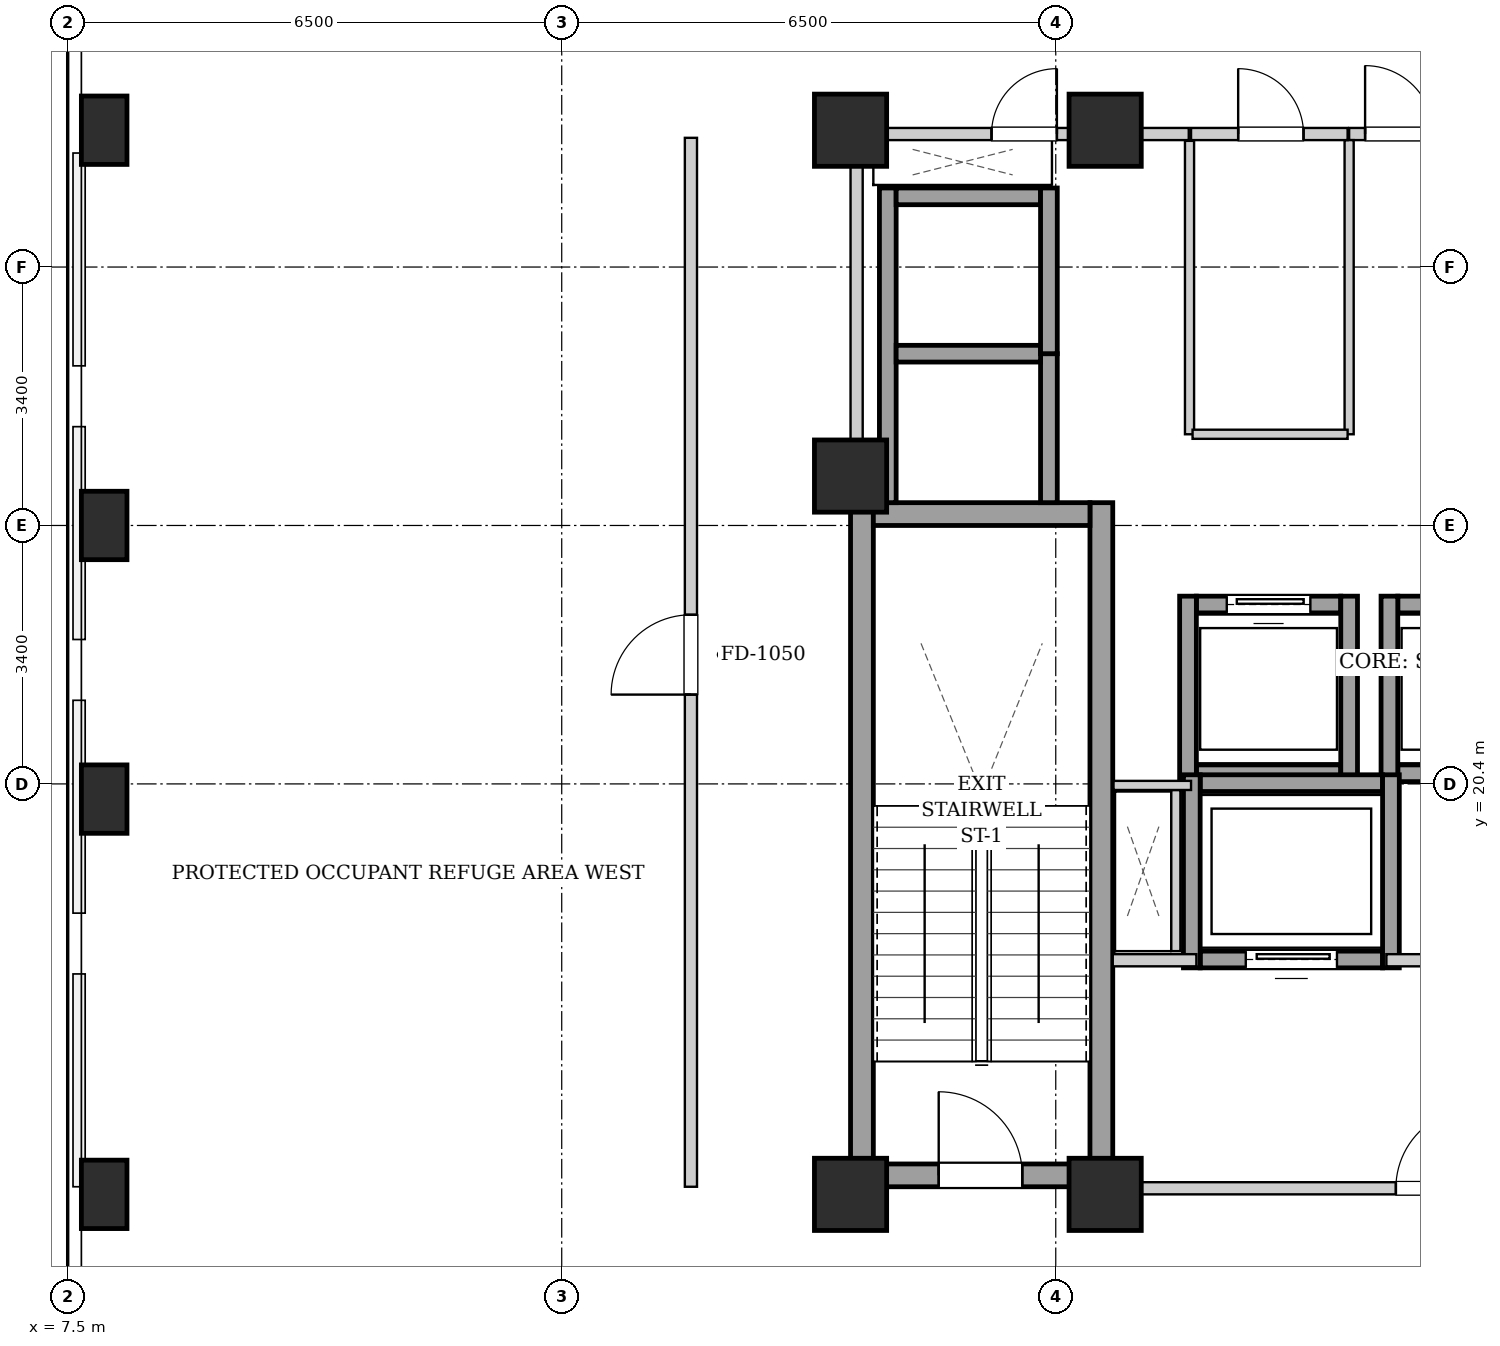
"""IFC4 building model, lengths in metres.
Left out: names, types, materials, properties, quantities, classifications, styles, units other than length and angle.
Written with IfcOpenShell. Run it as: python <this file> out.ifc"""

import sys

from ifc_helpers import new_model, si_unit, direction, frame, frame_2d, origin, origin_2d, place, context, subcontext, project, spatial, rectangle, extrude, element, fill, save


model = new_model("IFC4")
c1 = context("Model", 3, precision=1e-05, world=origin(), true_north=direction((0.0, 1.0)))
c2 = subcontext(c1, "Body", "Model", "MODEL_VIEW")
j1 = project(units=[si_unit("LENGTHUNIT", "METRE"), si_unit("PLANEANGLEUNIT", "RADIAN")], contexts=[c1])
p1 = place(None, origin())
s1 = spatial("IfcSite", under=j1, at=p1, CompositionType="ELEMENT")
p2 = place(p1, origin())
s2 = spatial("IfcBuilding", under=s1, at=p2, CompositionType="ELEMENT")
p3 = place(p2, frame((0.0, 0.0, 169.9)))
s3 = spatial("IfcBuildingStorey", under=s2, at=p3, CompositionType="ELEMENT", Elevation=169.9)
for number, where, z_axis, x_axis in (
    (1, (7.98, 15.0, 0.0), (0.0, 0.0, 1.0), (1.0, 0.0, 0.0)),
    (2, (7.98, 20.2, 0.0), (0.0, 0.0, 1.0), (1.0, 0.0, 0.0)),
    (3, (7.98, 23.8, 0.0), (0.0, 0.0, 1.0), (1.0, 0.0, 0.0)),
    (4, (7.98, 29.0, 0.0), (0.0, 0.0, 1.0), (1.0, 0.0, 0.0)),
):
    element("IfcColumn", number, at=place(p3, frame(where, z_axis=z_axis, x_axis=x_axis)), inside=s3, PredefinedType="COLUMN", context=c2, shape_type="SweptSolid", body=[
        extrude(rectangle(XDim=0.6, YDim=0.9, at=origin_2d()), origin(), (0.0, 0.0, 1.0), 4.5),
    ])
for number, where, z_axis, x_axis in (
    (5, (17.8, 15.0, 0.0), (0.0, 0.0, 1.0), (1.0, 0.0, 0.0)),
    (6, (21.15, 15.0, 0.0), (0.0, 0.0, 1.0), (1.0, 0.0, 0.0)),
    (7, (17.8, 29.0, 0.0), (0.0, 0.0, 1.0), (1.0, 0.0, 0.0)),
    (8, (21.15, 29.0, 0.0), (0.0, 0.0, 1.0), (1.0, 0.0, 0.0)),
    (9, (17.8, 24.45, 0.0), (0.0, 0.0, 1.0), (1.0, 0.0, 0.0)),
):
    element("IfcColumn", number, at=place(p3, frame(where, z_axis=z_axis, x_axis=x_axis)), inside=s3, PredefinedType="COLUMN", context=c2, shape_type="SweptSolid", body=[
        extrude(rectangle(XDim=0.95, YDim=0.95, at=origin_2d()), origin(), (0.0, 0.0, 1.0), 4.5),
    ])
for number, where, z_axis, x_axis in (
    (10, (17.95, 15.1, 0.0), (0.0, 0.0, 1.0), (0.0, 1.0, 0.0)),
    (11, (21.1, 15.1, 0.0), (0.0, 0.0, 1.0), (0.0, 1.0, 0.0)),
):
    element("IfcWall", number, at=place(p3, frame(where, z_axis=z_axis, x_axis=x_axis)), inside=s3, PredefinedType="SHEAR", context=c2, shape_type="SweptSolid", body=[
        extrude(rectangle(XDim=9.0, YDim=0.3, at=frame_2d((4.5, 0.0))), origin(), (0.0, 0.0, 1.0), 4.18),
    ])
p4 = place(p3, frame((18.1, 23.95, 0.0), z_axis=(0.0, 0.0, 1.0), x_axis=(1.0, 0.0, 0.0)))
e12 = element("IfcWall", 12, at=p4, inside=s3, PredefinedType="SHEAR", context=c2, shape_type="SweptSolid", body=[
    extrude(rectangle(XDim=2.85, YDim=0.3, at=frame_2d((1.425, 0.0))), origin(), (0.0, 0.0, 1.0), 4.18),
])
p5 = place(p3, frame((18.1, 15.25, 0.0), z_axis=(0.0, 0.0, 1.0), x_axis=(1.0, 0.0, 0.0)))
e13 = element("IfcWall", 13, at=p5, inside=s3, PredefinedType="SHEAR", context=c2, shape_type="SweptSolid", body=[
    extrude(rectangle(XDim=2.85, YDim=0.3, at=frame_2d((1.425, 0.0))), origin(), (0.0, 0.0, 1.0), 4.18),
])
p6 = place(p5, frame((0.86, 0.0, 0.0)))
e14 = element("IfcOpeningElement", 14, at=p6, cuts=e13, PredefinedType="OPENING", context=c2, shape_type="SweptSolid", body=[
    extrude(rectangle(XDim=1.1, YDim=2.05, at=frame_2d((0.55, 1.025))), frame((0.0, 0.16, 0.0), z_axis=(0.0, -1.0, 0.0), x_axis=(1.0, 0.0, 0.0)), (0.0, 0.0, 1.0), 0.32),
])
p7 = place(p3, frame((22.35, 20.54, 0.0), z_axis=(0.0, 0.0, 1.0), x_axis=(1.0, 0.0, 0.0)))
e15 = element("IfcWall", 15, at=p7, inside=s3, PredefinedType="SHEAR", context=c2, shape_type="SweptSolid", body=[
    extrude(rectangle(XDim=1.9, YDim=0.22, at=frame_2d((0.95, 0.0))), origin(), (0.0, 0.0, 1.0), 4.18),
])
p8 = place(p3, frame((22.35, 22.76, 0.0), z_axis=(0.0, 0.0, 1.0), x_axis=(1.0, 0.0, 0.0)))
e16 = element("IfcWall", 16, at=p8, inside=s3, PredefinedType="SHEAR", context=c2, shape_type="SweptSolid", body=[
    extrude(rectangle(XDim=1.9, YDim=0.22, at=frame_2d((0.95, 0.0))), origin(), (0.0, 0.0, 1.0), 4.18),
])
p9 = place(p8, frame((0.4, 0.0, 0.0)))
e17 = element("IfcOpeningElement", 17, at=p9, cuts=e16, PredefinedType="OPENING", context=c2, shape_type="SweptSolid", body=[
    extrude(rectangle(XDim=1.1, YDim=2.15, at=frame_2d((0.55, 1.075))), frame((0.0, 0.12, 0.0), z_axis=(0.0, -1.0, 0.0), x_axis=(1.0, 0.0, 0.0)), (0.0, 0.0, 1.0), 0.24),
])
for number, where, z_axis, x_axis in (
    (18, (22.24, 20.43, 0.0), (0.0, 0.0, 1.0), (0.0, 1.0, 0.0)),
    (19, (24.36, 20.43, 0.0), (0.0, 0.0, 1.0), (0.0, 1.0, 0.0)),
):
    element("IfcWall", number, at=place(p3, frame(where, z_axis=z_axis, x_axis=x_axis)), inside=s3, PredefinedType="SHEAR", context=c2, shape_type="SweptSolid", body=[
        extrude(rectangle(XDim=2.44, YDim=0.22, at=frame_2d((1.22, 0.0))), origin(), (0.0, 0.0, 1.0), 4.18),
    ])
p10 = place(p3, frame((25.0, 20.54, 0.0), z_axis=(0.0, 0.0, 1.0), x_axis=(1.0, 0.0, 0.0)))
e20 = element("IfcWall", 20, at=p10, inside=s3, PredefinedType="SHEAR", context=c2, shape_type="SweptSolid", body=[
    extrude(rectangle(XDim=1.9, YDim=0.22, at=frame_2d((0.95, 0.0))), origin(), (0.0, 0.0, 1.0), 4.18),
])
p11 = place(p3, frame((25.0, 22.76, 0.0), z_axis=(0.0, 0.0, 1.0), x_axis=(1.0, 0.0, 0.0)))
e21 = element("IfcWall", 21, at=p11, inside=s3, PredefinedType="SHEAR", context=c2, shape_type="SweptSolid", body=[
    extrude(rectangle(XDim=1.9, YDim=0.22, at=frame_2d((0.95, 0.0))), origin(), (0.0, 0.0, 1.0), 4.18),
])
p12 = place(p11, frame((0.4, 0.0, 0.0)))
e22 = element("IfcOpeningElement", 22, at=p12, cuts=e21, PredefinedType="OPENING", context=c2, shape_type="SweptSolid", body=[
    extrude(rectangle(XDim=1.1, YDim=2.15, at=frame_2d((0.55, 1.075))), frame((0.0, 0.12, 0.0), z_axis=(0.0, -1.0, 0.0), x_axis=(1.0, 0.0, 0.0)), (0.0, 0.0, 1.0), 0.24),
])
p13 = place(p3, frame((24.89, 20.43, 0.0), z_axis=(0.0, 0.0, 1.0), x_axis=(0.0, 1.0, 0.0)))
e23 = element("IfcWall", 23, at=p13, inside=s3, PredefinedType="SHEAR", context=c2, shape_type="SweptSolid", body=[
    extrude(rectangle(XDim=2.44, YDim=0.22, at=frame_2d((1.22, 0.0))), origin(), (0.0, 0.0, 1.0), 4.18),
])
p14 = place(p3, frame((18.29, 24.1, 0.0), z_axis=(0.0, 0.0, 1.0), x_axis=(0.0, 1.0, 0.0)))
e24 = element("IfcWall", 24, at=p14, inside=s3, PredefinedType="SHEAR", context=c2, shape_type="SweptSolid", body=[
    extrude(rectangle(XDim=4.14, YDim=0.22, at=frame_2d((2.07, 0.0))), origin(), (0.0, 0.0, 1.0), 4.18),
])
p15 = place(p3, frame((20.41, 24.1, 0.0), z_axis=(0.0, 0.0, 1.0), x_axis=(0.0, 1.0, 0.0)))
e25 = element("IfcWall", 25, at=p15, inside=s3, PredefinedType="SHEAR", context=c2, shape_type="SweptSolid", body=[
    extrude(rectangle(XDim=1.96, YDim=0.22, at=frame_2d((0.98, 0.0))), origin(), (0.0, 0.0, 1.0), 4.18),
])
for number, where, z_axis, x_axis in (
    (26, (18.4, 26.06, 0.0), (0.0, 0.0, 1.0), (1.0, 0.0, 0.0)),
    (27, (18.4, 28.13, 0.0), (0.0, 0.0, 1.0), (1.0, 0.0, 0.0)),
):
    element("IfcWall", number, at=place(p3, frame(where, z_axis=z_axis, x_axis=x_axis)), inside=s3, PredefinedType="SHEAR", context=c2, shape_type="SweptSolid", body=[
        extrude(rectangle(XDim=1.9, YDim=0.22, at=frame_2d((0.95, 0.0))), origin(), (0.0, 0.0, 1.0), 4.18),
    ])
p16 = place(p3, frame((20.41, 26.06, 0.0), z_axis=(0.0, 0.0, 1.0), x_axis=(0.0, 1.0, 0.0)))
e28 = element("IfcWall", 28, at=p16, inside=s3, PredefinedType="SHEAR", context=c2, shape_type="SweptSolid", body=[
    extrude(rectangle(XDim=2.18, YDim=0.22, at=frame_2d((1.09, 0.0))), origin(), (0.0, 0.0, 1.0), 4.18),
])
p17 = place(p3, frame((22.4, 18.09, 0.0), z_axis=(0.0, 0.0, 1.0), x_axis=(1.0, 0.0, 0.0)))
e29 = element("IfcWall", 29, at=p17, inside=s3, PredefinedType="SHEAR", context=c2, shape_type="SweptSolid", body=[
    extrude(rectangle(XDim=2.4, YDim=0.22, at=frame_2d((1.2, 0.0))), origin(), (0.0, 0.0, 1.0), 4.18),
])
p18 = place(p17, frame((0.6, 0.0, 0.0)))
e30 = element("IfcOpeningElement", 30, at=p18, cuts=e29, PredefinedType="OPENING", context=c2, shape_type="SweptSolid", body=[
    extrude(rectangle(XDim=1.2, YDim=2.15, at=frame_2d((0.6, 1.075))), frame((0.0, 0.12, 0.0), z_axis=(0.0, -1.0, 0.0), x_axis=(1.0, 0.0, 0.0)), (0.0, 0.0, 1.0), 0.24),
])
p19 = place(p3, frame((22.4, 20.41, 0.0), z_axis=(0.0, 0.0, 1.0), x_axis=(1.0, 0.0, 0.0)))
e31 = element("IfcWall", 31, at=p19, inside=s3, PredefinedType="SHEAR", context=c2, shape_type="SweptSolid", body=[
    extrude(rectangle(XDim=2.4, YDim=0.22, at=frame_2d((1.2, 0.0))), origin(), (0.0, 0.0, 1.0), 4.18),
])
for number, where, z_axis, x_axis in (
    (32, (22.29, 17.98, 0.0), (0.0, 0.0, 1.0), (0.0, 1.0, 0.0)),
    (33, (24.91, 17.98, 0.0), (0.0, 0.0, 1.0), (0.0, 1.0, 0.0)),
):
    element("IfcWall", number, at=place(p3, frame(where, z_axis=z_axis, x_axis=x_axis)), inside=s3, PredefinedType="SHEAR", context=c2, shape_type="SweptSolid", body=[
        extrude(rectangle(XDim=2.54, YDim=0.22, at=frame_2d((1.27, 0.0))), origin(), (0.0, 0.0, 1.0), 4.18),
    ])
p20 = place(p3, frame((21.25, 15.08, 0.0), z_axis=(0.0, 0.0, 1.0), x_axis=(1.0, 0.0, 0.0)))
e34 = element("IfcWall", 34, at=p20, inside=s3, PredefinedType="PARTITIONING", context=c2, shape_type="SweptSolid", body=[
    extrude(rectangle(XDim=8.5, YDim=0.16, at=frame_2d((4.25, 0.0))), origin(), (0.0, 0.0, 1.0), 4.18),
])
p21 = place(p20, frame((3.725, 0.0, 0.0)))
e35 = element("IfcOpeningElement", 35, at=p21, cuts=e34, PredefinedType="OPENING", context=c2, shape_type="SweptSolid", body=[
    extrude(rectangle(XDim=1.05, YDim=2.05, at=frame_2d((0.525, 1.025))), frame((0.0, 0.09, 0.0), z_axis=(0.0, -1.0, 0.0), x_axis=(1.0, 0.0, 0.0)), (0.0, 0.0, 1.0), 0.18),
])
p22 = place(p3, frame((21.25, 18.08, 0.0), z_axis=(0.0, 0.0, 1.0), x_axis=(1.0, 0.0, 0.0)))
e36 = element("IfcWall", 36, at=p22, inside=s3, PredefinedType="PARTITIONING", context=c2, shape_type="SweptSolid", body=[
    extrude(rectangle(XDim=1.1, YDim=0.16, at=frame_2d((0.55, 0.0))), origin(), (0.0, 0.0, 1.0), 4.18),
])
p23 = place(p3, frame((24.85, 18.08, 0.0), z_axis=(0.0, 0.0, 1.0), x_axis=(1.0, 0.0, 0.0)))
e37 = element("IfcWall", 37, at=p23, inside=s3, PredefinedType="PARTITIONING", context=c2, shape_type="SweptSolid", body=[
    extrude(rectangle(XDim=1.3, YDim=0.16, at=frame_2d((0.65, 0.0))), origin(), (0.0, 0.0, 1.0), 4.18),
])
p24 = place(p3, frame((17.88, 24.12, 0.0), z_axis=(0.0, 0.0, 1.0), x_axis=(0.0, 1.0, 0.0)))
e38 = element("IfcWall", 38, at=p24, inside=s3, PredefinedType="PARTITIONING", context=c2, shape_type="SweptSolid", body=[
    extrude(rectangle(XDim=4.76, YDim=0.16, at=frame_2d((2.38, 0.0))), origin(), (0.0, 0.0, 1.0), 4.18),
])
p25 = place(p3, frame((24.36, 28.95, 0.0), z_axis=(0.0, 0.0, 1.0), x_axis=(1.0, 0.0, 0.0)))
e39 = element("IfcWall", 39, at=p25, inside=s3, PredefinedType="PARTITIONING", context=c2, shape_type="SweptSolid", body=[
    extrude(rectangle(XDim=1.32, YDim=0.16, at=frame_2d((0.66, 0.0))), origin(), (0.0, 0.0, 1.0), 4.18),
])
p26 = place(p25, frame((0.21, 0.0, 0.0)))
e40 = element("IfcOpeningElement", 40, at=p26, cuts=e39, PredefinedType="OPENING", context=c2, shape_type="SweptSolid", body=[
    extrude(rectangle(XDim=0.9, YDim=2.05, at=frame_2d((0.45, 1.025))), frame((0.0, 0.09, 0.0), z_axis=(0.0, -1.0, 0.0), x_axis=(1.0, 0.0, 0.0)), (0.0, 0.0, 1.0), 0.18),
])
p27 = place(p3, frame((17.96, 28.95, 0.0), z_axis=(0.0, 0.0, 1.0), x_axis=(1.0, 0.0, 0.0)))
e41 = element("IfcWall", 41, at=p27, inside=s3, PredefinedType="PARTITIONING", context=c2, shape_type="SweptSolid", body=[
    extrude(rectangle(XDim=4.29, YDim=0.16, at=frame_2d((2.145, 0.0))), origin(), (0.0, 0.0, 1.0), 4.18),
])
p28 = place(p27, frame((1.695, 0.0, 0.0)))
e42 = element("IfcOpeningElement", 42, at=p28, cuts=e41, PredefinedType="OPENING", context=c2, shape_type="SweptSolid", body=[
    extrude(rectangle(XDim=0.86, YDim=2.05, at=frame_2d((0.43, 1.025))), frame((0.0, 0.09, 0.0), z_axis=(0.0, -1.0, 0.0), x_axis=(1.0, 0.0, 0.0)), (0.0, 0.0, 1.0), 0.18),
])
p29 = place(p3, frame((22.08, 18.2, 0.0), z_axis=(0.0, 0.0, 1.0), x_axis=(0.0, 1.0, 0.0)))
e43 = element("IfcWall", 43, at=p29, inside=s3, PredefinedType="PARTITIONING", context=c2, shape_type="SweptSolid", body=[
    extrude(rectangle(XDim=2.12, YDim=0.12, at=frame_2d((1.06, 0.0))), origin(), (0.0, 0.0, 1.0), 4.18),
])
p30 = place(p3, frame((22.28, 20.38, 0.0), z_axis=(0.0, 0.0, 1.0), x_axis=(-1.0, 0.0, 0.0)))
e44 = element("IfcWall", 44, at=p30, inside=s3, PredefinedType="PARTITIONING", context=c2, shape_type="SweptSolid", body=[
    extrude(rectangle(XDim=1.02, YDim=0.12, at=frame_2d((0.51, 0.0))), origin(), (0.0, 0.0, 1.0), 4.18),
])
p31 = place(p3, frame((24.36, 25.0, 0.0), z_axis=(0.0, 0.0, 1.0), x_axis=(0.0, 1.0, 0.0)))
e45 = element("IfcWall", 45, at=p31, inside=s3, PredefinedType="PARTITIONING", context=c2, shape_type="SweptSolid", body=[
    extrude(rectangle(XDim=3.87, YDim=0.12, at=frame_2d((1.935, 0.0))), origin(), (0.0, 0.0, 1.0), 4.18),
])
p32 = place(p3, frame((22.26, 25.0, 0.0), z_axis=(0.0, 0.0, 1.0), x_axis=(0.0, 1.0, 0.0)))
e46 = element("IfcWall", 46, at=p32, inside=s3, PredefinedType="PARTITIONING", context=c2, shape_type="SweptSolid", body=[
    extrude(rectangle(XDim=3.86, YDim=0.12, at=frame_2d((1.93, 0.0))), origin(), (0.0, 0.0, 1.0), 4.18),
])
p33 = place(p3, frame((22.3, 25.0, 0.0), z_axis=(0.0, 0.0, 1.0), x_axis=(1.0, 0.0, 0.0)))
e47 = element("IfcWall", 47, at=p33, inside=s3, PredefinedType="PARTITIONING", context=c2, shape_type="SweptSolid", body=[
    extrude(rectangle(XDim=2.04, YDim=0.12, at=frame_2d((1.02, 0.0))), origin(), (0.0, 0.0, 1.0), 4.18),
])
p34 = place(p3, frame((22.28, 28.95, 0.0), z_axis=(0.0, 0.0, 1.0), x_axis=(1.0, 0.0, 0.0)))
e48 = element("IfcWall", 48, at=p34, inside=s3, PredefinedType="PARTITIONING", context=c2, shape_type="SweptSolid", body=[
    extrude(rectangle(XDim=2.06, YDim=0.16, at=frame_2d((1.03, 0.0))), origin(), (0.0, 0.0, 1.0), 4.18),
])
p35 = place(p34, frame((0.62, 0.0, 0.0)))
e49 = element("IfcOpeningElement", 49, at=p35, cuts=e48, PredefinedType="OPENING", context=c2, shape_type="SweptSolid", body=[
    extrude(rectangle(XDim=0.86, YDim=2.05, at=frame_2d((0.43, 1.025))), frame((0.0, 0.09, 0.0), z_axis=(0.0, -1.0, 0.0), x_axis=(1.0, 0.0, 0.0)), (0.0, 0.0, 1.0), 0.18),
])
p36 = place(p3, frame((15.7, 15.1, 0.0), z_axis=(0.0, 0.0, 1.0), x_axis=(0.0, 1.0, 0.0)))
e50 = element("IfcWall", 50, at=p36, inside=s3, PredefinedType="PARTITIONING", context=c2, shape_type="SweptSolid", body=[
    extrude(rectangle(XDim=13.8, YDim=0.16, at=frame_2d((6.9, 0.0))), origin(), (0.0, 0.0, 1.0), 4.18),
])
p37 = place(p36, frame((6.475, 0.0, 0.0)))
e51 = element("IfcOpeningElement", 51, at=p37, cuts=e50, PredefinedType="OPENING", context=c2, shape_type="SweptSolid", body=[
    extrude(rectangle(XDim=1.05, YDim=2.05, at=frame_2d((0.525, 1.025))), frame((0.0, 0.09, 0.0), z_axis=(0.0, -1.0, 0.0), x_axis=(1.0, 0.0, 0.0)), (0.0, 0.0, 1.0), 0.18),
])
p38 = place(p6, origin())
e52 = element("IfcDoor", 52, at=p38, inside=s3, OperationType="SINGLE_SWING_LEFT", PredefinedType="DOOR", context=c2, shape_type="SweptSolid", body=[
    extrude(rectangle(XDim=1.1, YDim=2.05, at=frame_2d((0.55, 1.025))), frame((0.0, 0.025, 0.0), z_axis=(0.0, -1.0, 0.0), x_axis=(1.0, 0.0, 0.0)), (0.0, 0.0, 1.0), 0.05),
])
fill(e14, e52)
p39 = place(p9, origin())
e53 = element("IfcDoor", 53, at=p39, inside=s3, OperationType="SLIDING_TO_LEFT", PredefinedType="DOOR", context=c2, shape_type="SweptSolid", body=[
    extrude(rectangle(XDim=1.1, YDim=2.15, at=frame_2d((0.55, 1.075))), frame((0.0, 0.025, 0.0), z_axis=(0.0, -1.0, 0.0), x_axis=(1.0, 0.0, 0.0)), (0.0, 0.0, 1.0), 0.05),
])
fill(e17, e53)
p40 = place(p18, origin())
e54 = element("IfcDoor", 54, at=p40, inside=s3, OperationType="SLIDING_TO_LEFT", PredefinedType="DOOR", context=c2, shape_type="SweptSolid", body=[
    extrude(rectangle(XDim=1.2, YDim=2.15, at=frame_2d((0.6, 1.075))), frame((0.0, 0.025, 0.0), z_axis=(0.0, -1.0, 0.0), x_axis=(1.0, 0.0, 0.0)), (0.0, 0.0, 1.0), 0.05),
])
fill(e30, e54)
p41 = place(p21, origin())
e55 = element("IfcDoor", 55, at=p41, inside=s3, OperationType="SINGLE_SWING_RIGHT", PredefinedType="DOOR", context=c2, shape_type="SweptSolid", body=[
    extrude(rectangle(XDim=1.05, YDim=2.05, at=frame_2d((0.525, 1.025))), frame((0.0, 0.025, 0.0), z_axis=(0.0, -1.0, 0.0), x_axis=(1.0, 0.0, 0.0)), (0.0, 0.0, 1.0), 0.05),
])
fill(e35, e55)
p42 = place(p26, origin())
e56 = element("IfcDoor", 56, at=p42, inside=s3, OperationType="SINGLE_SWING_LEFT", PredefinedType="DOOR", context=c2, shape_type="SweptSolid", body=[
    extrude(rectangle(XDim=0.9, YDim=2.05, at=frame_2d((0.45, 1.025))), frame((0.0, 0.025, 0.0), z_axis=(0.0, -1.0, 0.0), x_axis=(1.0, 0.0, 0.0)), (0.0, 0.0, 1.0), 0.05),
])
fill(e40, e56)
p43 = place(p28, origin())
e57 = element("IfcDoor", 57, at=p43, inside=s3, OperationType="SINGLE_SWING_RIGHT", PredefinedType="DOOR", context=c2, shape_type="SweptSolid", body=[
    extrude(rectangle(XDim=0.86, YDim=2.05, at=frame_2d((0.43, 1.025))), frame((0.0, 0.025, 0.0), z_axis=(0.0, -1.0, 0.0), x_axis=(1.0, 0.0, 0.0)), (0.0, 0.0, 1.0), 0.05),
])
fill(e42, e57)
p44 = place(p35, origin())
e58 = element("IfcDoor", 58, at=p44, inside=s3, OperationType="SINGLE_SWING_LEFT", PredefinedType="DOOR", context=c2, shape_type="SweptSolid", body=[
    extrude(rectangle(XDim=0.86, YDim=2.05, at=frame_2d((0.43, 1.025))), frame((0.0, 0.025, 0.0), z_axis=(0.0, -1.0, 0.0), x_axis=(1.0, 0.0, 0.0)), (0.0, 0.0, 1.0), 0.05),
])
fill(e49, e58)
p45 = place(p37, origin())
e59 = element("IfcDoor", 59, at=p45, inside=s3, OperationType="SINGLE_SWING_LEFT", PredefinedType="DOOR", context=c2, shape_type="SweptSolid", body=[
    extrude(rectangle(XDim=1.05, YDim=2.05, at=frame_2d((0.525, 1.025))), frame((0.0, 0.025, 0.0), z_axis=(0.0, -1.0, 0.0), x_axis=(1.0, 0.0, 0.0)), (0.0, 0.0, 1.0), 0.05),
])
fill(e51, e59)
save(model, sys.argv[1])
